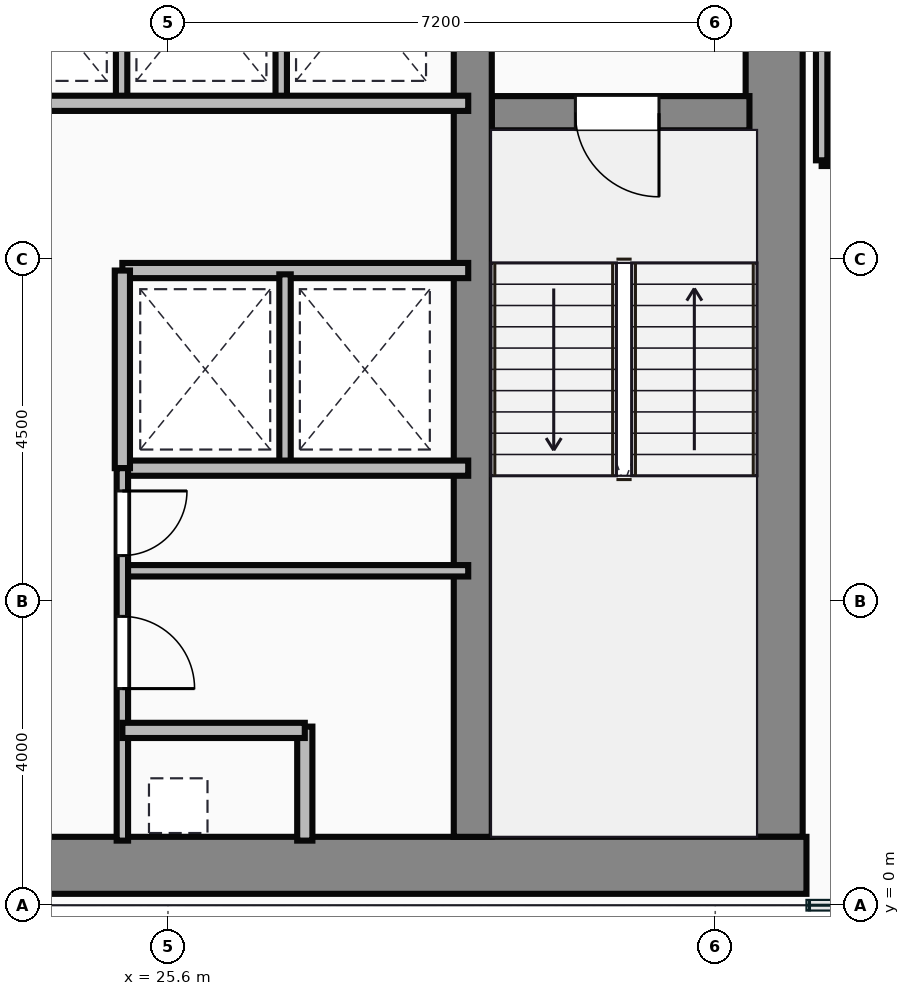
"""IFC4 building model, lengths in metres.
Left out: names, types, materials, properties, quantities, classifications, styles, units other than length and angle.
Written with IfcOpenShell. Run it as: python <this file> out.ifc"""

import sys

from ifc_helpers import new_model, si_unit, direction, frame, frame_2d, origin, place, context, subcontext, project, spatial, rectangle, extrude, source, transform, mapped, element, fill, save


model = new_model("IFC4")
c1 = context("Model", 3, precision=1e-05, world=origin(), true_north=direction((0.0, 1.0)))
c2 = subcontext(c1, "Body", "Model", "MODEL_VIEW")
j1 = project(units=[si_unit("LENGTHUNIT", "METRE"), si_unit("PLANEANGLEUNIT", "RADIAN")], contexts=[c1])
p1 = place(None, origin())
s1 = spatial("IfcSite", under=j1, at=p1, CompositionType="ELEMENT")
p2 = place(p1, origin())
s2 = spatial("IfcBuilding", under=s1, at=p2, CompositionType="ELEMENT")
p3 = place(p2, frame((0.0, 0.0, 140.6)))
s3 = spatial("IfcBuildingStorey", under=s2, at=p3, CompositionType="ELEMENT", Elevation=140.6)
m1 = source(origin(), c2, "Body", "SweptSolid", [
    extrude(rectangle(XDim=29.5, YDim=0.75, at=frame_2d((14.75, 0.0))), origin(), (0.0, 0.0, 1.0), 3.65),
])
p4 = place(p3, frame((4.5, 0.525, 0.0), z_axis=(0.0, 0.0, 1.0), x_axis=(1.0, 0.0, 0.0)))
e1 = element("IfcWall", 1, at=p4, inside=s3, PredefinedType="SHEAR", context=c2, shape_type="MappedRepresentation", body=[
    mapped(m1, transform((0.0, 0.0, 0.0))),
])
m2 = source(origin(), c2, "Body", "SweptSolid", [
    extrude(rectangle(XDim=13.1, YDim=0.75, at=frame_2d((6.55, 0.0))), origin(), (0.0, 0.0, 1.0), 3.65),
])
p5 = place(p3, frame((33.575, 0.9, 0.0), z_axis=(0.0, 0.0, 1.0), x_axis=(0.0, 1.0, 0.0)))
e2 = element("IfcWall", 2, at=p5, inside=s3, PredefinedType="SHEAR", context=c2, shape_type="MappedRepresentation", body=[
    mapped(m2, transform((0.0, 0.0, 0.0))),
])
m3 = source(origin(), c2, "Body", "SweptSolid", [
    extrude(rectangle(XDim=12.35, YDim=0.5, at=frame_2d((6.175, 0.0))), origin(), (0.0, 0.0, 1.0), 3.65),
])
p6 = place(p3, frame((29.61, 0.9, 0.0), z_axis=(0.0, 0.0, 1.0), x_axis=(0.0, 1.0, 0.0)))
e3 = element("IfcWall", 3, at=p6, inside=s3, PredefinedType="SHEAR", context=c2, shape_type="MappedRepresentation", body=[
    mapped(m3, transform((0.0, 0.0, 0.0))),
])
m4 = source(origin(), c2, "Body", "SweptSolid", [
    extrude(rectangle(XDim=3.39, YDim=0.45, at=frame_2d((1.695, 0.0))), origin(), (0.0, 0.0, 1.0), 3.65),
])
p7 = place(p3, frame((29.86, 10.42, 0.0), z_axis=(0.0, 0.0, 1.0), x_axis=(1.0, 0.0, 0.0)))
e4 = element("IfcWall", 4, at=p7, inside=s3, PredefinedType="SHEAR", context=c2, shape_type="MappedRepresentation", body=[
    mapped(m4, transform((0.0, 0.0, 0.0))),
])
p8 = place(p7, frame((1.1, 0.0, 0.0)))
e5 = element("IfcOpeningElement", 5, at=p8, cuts=e4, PredefinedType="OPENING", context=c2, shape_type="SweptSolid", body=[
    extrude(rectangle(XDim=1.1, YDim=2.15, at=frame_2d((0.55, 1.075))), frame((0.0, 0.235, 0.0), z_axis=(0.0, -1.0, 0.0), x_axis=(1.0, 0.0, 0.0)), (0.0, 0.0, 1.0), 0.47),
])
m5 = source(origin(), c2, "Body", "SweptSolid", [
    extrude(rectangle(XDim=8.8, YDim=0.2, at=frame_2d((4.4, 0.0))), origin(), (0.0, 0.0, 1.0), 3.4),
])
p9 = place(p3, frame((20.75, 10.55, 0.0), z_axis=(0.0, 0.0, 1.0), x_axis=(1.0, 0.0, 0.0)))
e6 = element("IfcWall", 6, at=p9, inside=s3, PredefinedType="PARTITIONING", context=c2, shape_type="MappedRepresentation", body=[
    mapped(m5, transform((0.0, 0.0, 0.0))),
])
m6 = source(origin(), c2, "Body", "SweptSolid", [
    extrude(rectangle(XDim=2.85, YDim=0.15, at=frame_2d((1.425, 0.0))), origin(), (0.0, 0.0, 1.0), 3.4),
])
for number, where, z_axis, x_axis in (
    (7, (24.99, 10.6, 0.0), (0.0, 0.0, 1.0), (0.0, 1.0, 0.0)),
    (8, (27.09, 10.6, 0.0), (0.0, 0.0, 1.0), (0.0, 1.0, 0.0)),
):
    element("IfcWall", number, at=place(p3, frame(where, z_axis=z_axis, x_axis=x_axis)), inside=s3, PredefinedType="PARTITIONING", context=c2, shape_type="MappedRepresentation", body=[
        mapped(m6, transform((0.0, 0.0, 0.0))),
    ])
m7 = source(origin(), c2, "Body", "SweptSolid", [
    extrude(rectangle(XDim=4.55, YDim=0.2, at=frame_2d((2.275, 0.0))), origin(), (0.0, 0.0, 1.0), 3.4),
])
for number, where, z_axis, x_axis in (
    (9, (25.0, 8.35, 0.0), (0.0, 0.0, 1.0), (1.0, 0.0, 0.0)),
    (10, (25.0, 5.75, 0.0), (0.0, 0.0, 1.0), (1.0, 0.0, 0.0)),
):
    element("IfcWall", number, at=place(p3, frame(where, z_axis=z_axis, x_axis=x_axis)), inside=s3, PredefinedType="PARTITIONING", context=c2, shape_type="MappedRepresentation", body=[
        mapped(m7, transform((0.0, 0.0, 0.0))),
    ])
m8 = source(origin(), c2, "Body", "SweptSolid", [
    extrude(rectangle(XDim=2.6, YDim=0.2, at=frame_2d((1.3, 0.0))), origin(), (0.0, 0.0, 1.0), 3.4),
])
p10 = place(p3, frame((25.0, 5.75, 0.0), z_axis=(0.0, 0.0, 1.0), x_axis=(0.0, 1.0, 0.0)))
e11 = element("IfcWall", 11, at=p10, inside=s3, PredefinedType="PARTITIONING", context=c2, shape_type="MappedRepresentation", body=[
    mapped(m8, transform((0.0, 0.0, 0.0))),
])
m9 = source(origin(), c2, "Body", "SweptSolid", [
    extrude(rectangle(XDim=2.5, YDim=0.15, at=frame_2d((1.25, 0.0))), origin(), (0.0, 0.0, 1.0), 3.4),
])
p11 = place(p3, frame((27.14, 5.8, 0.0), z_axis=(0.0, 0.0, 1.0), x_axis=(0.0, 1.0, 0.0)))
e12 = element("IfcWall", 12, at=p11, inside=s3, PredefinedType="PARTITIONING", context=c2, shape_type="MappedRepresentation", body=[
    mapped(m9, transform((0.0, 0.0, 0.0))),
])
m10 = source(origin(), c2, "Body", "SweptSolid", [
    extrude(rectangle(XDim=4.9, YDim=0.15, at=frame_2d((2.45, 0.0))), origin(), (0.0, 0.0, 1.0), 3.4),
])
p12 = place(p3, frame((25.0, 0.85, 0.0), z_axis=(0.0, 0.0, 1.0), x_axis=(0.0, 1.0, 0.0)))
e13 = element("IfcWall", 13, at=p12, inside=s3, PredefinedType="PARTITIONING", context=c2, shape_type="MappedRepresentation", body=[
    mapped(m10, transform((0.0, 0.0, 0.0))),
])
p13 = place(p12, frame((2.0, 0.0, 0.0)))
e14 = element("IfcOpeningElement", 14, at=p13, cuts=e13, PredefinedType="OPENING", context=c2, shape_type="SweptSolid", body=[
    extrude(rectangle(XDim=0.95, YDim=2.15, at=frame_2d((0.475, 1.075))), frame((0.0, 0.085, 0.0), z_axis=(0.0, -1.0, 0.0), x_axis=(1.0, 0.0, 0.0)), (0.0, 0.0, 1.0), 0.17),
])
p14 = place(p12, frame((3.75, 0.0, 0.0)))
e15 = element("IfcOpeningElement", 15, at=p14, cuts=e13, PredefinedType="OPENING", context=c2, shape_type="SweptSolid", body=[
    extrude(rectangle(XDim=0.85, YDim=2.15, at=frame_2d((0.425, 1.075))), frame((0.0, 0.085, 0.0), z_axis=(0.0, -1.0, 0.0), x_axis=(1.0, 0.0, 0.0)), (0.0, 0.0, 1.0), 0.17),
])
m11 = source(origin(), c2, "Body", "SweptSolid", [
    extrude(rectangle(XDim=2.4, YDim=0.2, at=frame_2d((1.2, 0.0))), origin(), (0.0, 0.0, 1.0), 3.4),
])
p15 = place(p3, frame((25.0, 2.3, 0.0), z_axis=(0.0, 0.0, 1.0), x_axis=(1.0, 0.0, 0.0)))
e16 = element("IfcWall", 16, at=p15, inside=s3, PredefinedType="PARTITIONING", context=c2, shape_type="MappedRepresentation", body=[
    mapped(m11, transform((0.0, 0.0, 0.0))),
])
m12 = source(origin(), c2, "Body", "SweptSolid", [
    extrude(rectangle(XDim=1.5, YDim=0.2, at=frame_2d((0.75, 0.0))), origin(), (0.0, 0.0, 1.0), 3.4),
])
p16 = place(p3, frame((27.4, 0.85, 0.0), z_axis=(0.0, 0.0, 1.0), x_axis=(0.0, 1.0, 0.0)))
e17 = element("IfcWall", 17, at=p16, inside=s3, PredefinedType="PARTITIONING", context=c2, shape_type="MappedRepresentation", body=[
    mapped(m12, transform((0.0, 0.0, 0.0))),
])
m13 = source(origin(), c2, "Body", "SweptSolid", [
    extrude(rectangle(XDim=4.55, YDim=0.15, at=frame_2d((2.275, 0.0))), origin(), (0.0, 0.0, 1.0), 3.4),
])
p17 = place(p3, frame((25.0, 4.4, 0.0), z_axis=(0.0, 0.0, 1.0), x_axis=(1.0, 0.0, 0.0)))
e18 = element("IfcWall", 18, at=p17, inside=s3, PredefinedType="PARTITIONING", context=c2, shape_type="MappedRepresentation", body=[
    mapped(m13, transform((0.0, 0.0, 0.0))),
])
m14 = source(origin(), c2, "Body", "SweptSolid", [
    extrude(rectangle(XDim=4.8, YDim=0.15, at=frame_2d((2.4, 0.0))), origin(), (0.0, 0.0, 1.0), 3.4),
])
p18 = place(p3, frame((34.2, 9.8, 0.0), z_axis=(0.0, 0.0, 1.0), x_axis=(1.0, 0.0, 0.0)))
e19 = element("IfcWall", 19, at=p18, inside=s3, PredefinedType="PARTITIONING", context=c2, shape_type="MappedRepresentation", body=[
    mapped(m14, transform((0.0, 0.0, 0.0))),
])
m15 = source(origin(), c2, "Body", "SweptSolid", [
    extrude(rectangle(XDim=4.18, YDim=0.15, at=frame_2d((2.09, 0.0))), origin(), (0.0, 0.0, 1.0), 3.4),
])
p19 = place(p3, frame((34.2, 9.8, 0.0), z_axis=(0.0, 0.0, 1.0), x_axis=(0.0, 1.0, 0.0)))
e20 = element("IfcWall", 20, at=p19, inside=s3, PredefinedType="PARTITIONING", context=c2, shape_type="MappedRepresentation", body=[
    mapped(m15, transform((0.0, 0.0, 0.0))),
])
m16 = source(origin(), c2, "Body", "SweptSolid", [
    extrude(rectangle(XDim=1.1, YDim=2.15, at=frame_2d((0.55, 1.075))), frame((0.0, 0.025, 0.0), z_axis=(0.0, -1.0, 0.0), x_axis=(1.0, 0.0, 0.0)), (0.0, 0.0, 1.0), 0.05),
])
p20 = place(p8, frame((1.1, 0.0, 0.0), z_axis=(0.0, 0.0, 1.0), x_axis=(-1.0, 0.0, 0.0)))
e21 = element("IfcDoor", 21, at=p20, inside=s3, OperationType="SINGLE_SWING_RIGHT", PredefinedType="DOOR", context=c2, shape_type="MappedRepresentation", body=[
    mapped(m16, transform((0.0, 0.0, 0.0))),
])
fill(e5, e21)
m17 = source(origin(), c2, "Body", "SweptSolid", [
    extrude(rectangle(XDim=0.95, YDim=2.15, at=frame_2d((0.475, 1.075))), frame((0.0, 0.025, 0.0), z_axis=(0.0, -1.0, 0.0), x_axis=(1.0, 0.0, 0.0)), (0.0, 0.0, 1.0), 0.05),
])
p21 = place(p13, origin())
e22 = element("IfcDoor", 22, at=p21, inside=s3, OperationType="SINGLE_SWING_LEFT", PredefinedType="DOOR", context=c2, shape_type="MappedRepresentation", body=[
    mapped(m17, transform((0.0, 0.0, 0.0))),
])
fill(e14, e22)
m18 = source(origin(), c2, "Body", "SweptSolid", [
    extrude(rectangle(XDim=0.85, YDim=2.15, at=frame_2d((0.425, 1.075))), frame((0.0, 0.025, 0.0), z_axis=(0.0, -1.0, 0.0), x_axis=(1.0, 0.0, 0.0)), (0.0, 0.0, 1.0), 0.05),
])
p22 = place(p14, origin())
e23 = element("IfcDoor", 23, at=p22, inside=s3, OperationType="SINGLE_SWING_RIGHT", PredefinedType="DOOR", context=c2, shape_type="MappedRepresentation", body=[
    mapped(m18, transform((0.0, 0.0, 0.0))),
])
fill(e15, e23)
save(model, sys.argv[1])
